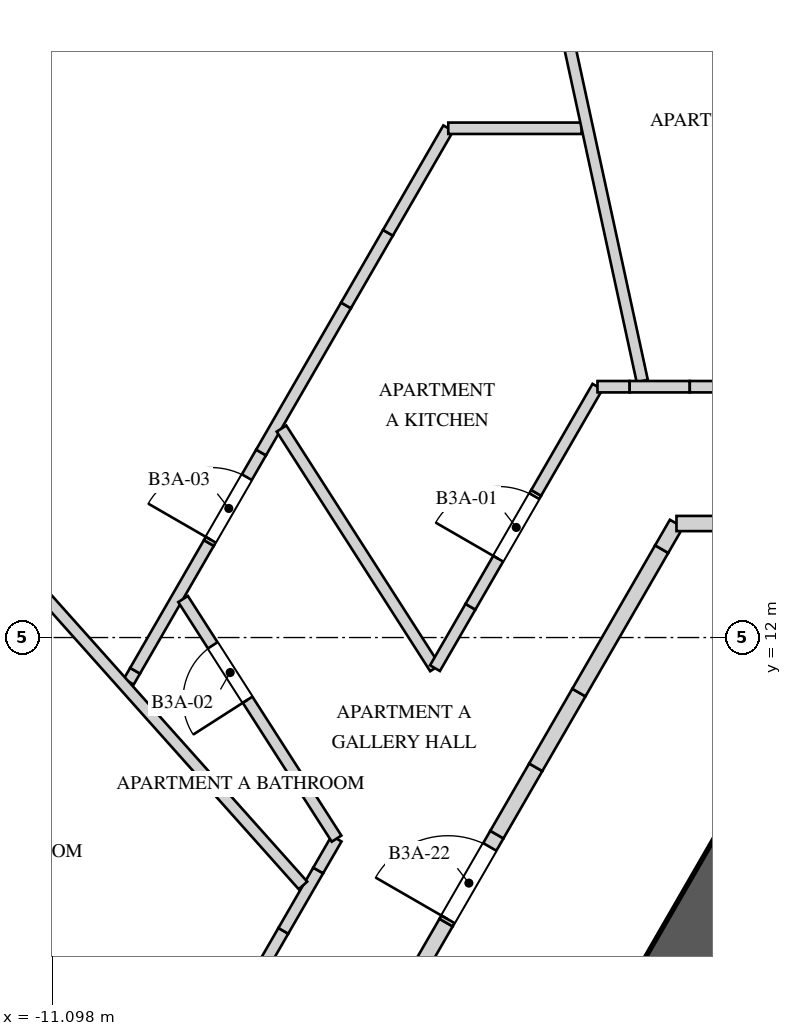
"""IFC4 building model, lengths in metres.
Left out: names, types, materials, properties, quantities, classifications, styles, units other than length and angle.
Written with IfcOpenShell. Run it as: python <this file> out.ifc"""

import sys

from ifc_helpers import new_model, si_unit, direction, frame, frame_2d, origin, place, context, subcontext, project, spatial, polyline, rectangle, outline, extrude, element, fill, save


model = new_model("IFC4")
c1 = context("Model", 3, precision=1e-05, world=origin(), true_north=direction((0.0, 1.0)))
c2 = subcontext(c1, "Body", "Model", "MODEL_VIEW")
j1 = project(units=[si_unit("LENGTHUNIT", "METRE"), si_unit("PLANEANGLEUNIT", "RADIAN")], contexts=[c1])
p1 = place(None, origin())
s1 = spatial("IfcSite", under=j1, at=p1, CompositionType="ELEMENT")
p2 = place(p1, origin())
s2 = spatial("IfcBuilding", under=s1, at=p2, CompositionType="ELEMENT")
p3 = place(p2, frame((0.0, 0.0, 129.6)))
s3 = spatial("IfcBuildingStorey", under=s2, at=p3, CompositionType="ELEMENT", Elevation=129.6)
p4 = place(p3, frame((-1.184, 10.55, 0.0), z_axis=(0.0, 0.0, 1.0), x_axis=(-0.500004814304, -0.866022624227, 0.0)))
e1 = element("IfcWall", 1, at=p4, inside=s3, PredefinedType="SHEAR", context=c2, shape_type="SweptSolid", body=[
    extrude(rectangle(XDim=17.09, YDim=0.9, at=frame_2d((8.545, 0.0))), origin(), (0.0, 0.0, 1.0), 4.0),
])
p5 = place(p4, frame((6.75, 0.0, 0.0)))
e2 = element("IfcOpeningElement", 2, at=p5, cuts=e1, PredefinedType="OPENING", context=c2, shape_type="SweptSolid", body=[
    extrude(rectangle(XDim=1.0, YDim=2.4, at=frame_2d((0.5, 1.2))), frame((0.0, 0.46, 0.0), z_axis=(0.0, -1.0, 0.0), x_axis=(1.0, 0.0, 0.0)), (0.0, 0.0, 1.0), 0.92),
])
p6 = place(p4, frame((14.678, 0.0, 0.0)))
e3 = element("IfcOpeningElement", 3, at=p6, cuts=e1, PredefinedType="OPENING", context=c2, shape_type="SweptSolid", body=[
    extrude(rectangle(XDim=0.8, YDim=2.1, at=frame_2d((0.4, 1.05))), frame((0.0, 0.46, 0.0), z_axis=(0.0, -1.0, 0.0), x_axis=(1.0, 0.0, 0.0)), (0.0, 0.0, 1.0), 0.92),
])
p7 = place(p3, frame((1.597, 19.024, 0.0), z_axis=(0.0, 0.0, 1.0), x_axis=(-0.838677021821, 0.54462909679, 0.0)))
e4 = element("IfcWall", 4, at=p7, inside=s3, PredefinedType="SOLIDWALL", context=c2, shape_type="SweptSolid", body=[
    extrude(rectangle(XDim=7.072, YDim=0.45, at=frame_2d((3.536, 0.0))), origin(), (0.0, 0.0, 1.0), 3.3),
])
p8 = place(p7, frame((0.195, 0.0, 0.5)))
e5 = element("IfcOpeningElement", 5, at=p8, cuts=e4, PredefinedType="OPENING", context=c2, shape_type="SweptSolid", body=[
    extrude(rectangle(XDim=1.75, YDim=2.65, at=frame_2d((0.875, 1.325))), frame((0.0, 0.235, 0.0), z_axis=(0.0, -1.0, 0.0), x_axis=(1.0, 0.0, 0.0)), (0.0, 0.0, 1.0), 0.47),
])
p9 = place(p7, frame((2.661, 0.0, 0.5)))
e6 = element("IfcOpeningElement", 6, at=p9, cuts=e4, PredefinedType="OPENING", context=c2, shape_type="SweptSolid", body=[
    extrude(rectangle(XDim=1.75, YDim=2.65, at=frame_2d((0.875, 1.325))), frame((0.0, 0.235, 0.0), z_axis=(0.0, -1.0, 0.0), x_axis=(1.0, 0.0, 0.0)), (0.0, 0.0, 1.0), 0.47),
])
p10 = place(p7, frame((5.126, 0.0, 0.5)))
e7 = element("IfcOpeningElement", 7, at=p10, cuts=e4, PredefinedType="OPENING", context=c2, shape_type="SweptSolid", body=[
    extrude(rectangle(XDim=1.75, YDim=2.0, at=frame_2d((0.875, 1.0))), frame((0.0, 0.235, 0.0), z_axis=(0.0, -1.0, 0.0), x_axis=(1.0, 0.0, 0.0)), (0.0, 0.0, 1.0), 0.47),
])
p11 = place(p3, frame((-0.766, 9.772, 0.0), z_axis=(0.0, 0.0, 1.0), x_axis=(-0.500009909098, -0.866019682689, 0.0)))
e8 = element("IfcWall", 8, at=p11, inside=s3, PredefinedType="SOLIDWALL", context=c2, shape_type="SweptSolid", body=[
    extrude(rectangle(XDim=6.2, YDim=0.4, at=frame_2d((3.1, 0.0))), origin(), (0.0, 0.0, 1.0), 3.65),
])
p12 = place(p3, frame((-9.458, 5.719, 0.0), z_axis=(0.0, 0.0, 1.0), x_axis=(0.499996941814, 0.866027169422, 0.0)))
e9 = element("IfcWall", 9, at=p12, inside=s3, PredefinedType="PARTITIONING", context=c2, shape_type="SweptSolid", body=[
    extrude(rectangle(XDim=2.797, YDim=0.15, at=frame_2d((1.399, 0.0))), origin(), (0.0, 0.0, 1.0), 3.65),
])
p13 = place(p12, frame((1.1, 0.0, 0.0)))
e10 = element("IfcOpeningElement", 10, at=p13, cuts=e9, PredefinedType="OPENING", context=c2, shape_type="SweptSolid", body=[
    extrude(rectangle(XDim=0.95, YDim=2.4, at=frame_2d((0.475, 1.2))), frame((0.0, 0.085, 0.0), z_axis=(0.0, -1.0, 0.0), x_axis=(1.0, 0.0, 0.0)), (0.0, 0.0, 1.0), 0.17),
])
p14 = place(p3, frame((-8.059, 8.141, 0.0), z_axis=(0.0, 0.0, 1.0), x_axis=(0.500060322201, 0.865990573944, 0.0)))
e11 = element("IfcWall", 11, at=p14, inside=s3, PredefinedType="PARTITIONING", context=c2, shape_type="SweptSolid", body=[
    extrude(rectangle(XDim=0.917, YDim=0.15, at=frame_2d((0.459, 0.0))), origin(), (0.0, 0.0, 1.0), 2.55),
])
p15 = place(p3, frame((-7.6, 8.936, 0.0), z_axis=(0.0, 0.0, 1.0), x_axis=(0.499941024108, 0.866059450854, 0.0)))
e12 = element("IfcWall", 12, at=p15, inside=s3, PredefinedType="PARTITIONING", context=c2, shape_type="SweptSolid", body=[
    extrude(rectangle(XDim=0.483, YDim=0.15, at=frame_2d((0.242, 0.0))), origin(), (0.0, 0.0, 1.0), 3.65),
])
p16 = place(p3, frame((-10.093, 11.419, 0.0), z_axis=(0.0, 0.0, 1.0), x_axis=(0.500399834964, 0.865794435861, 0.0)))
e13 = element("IfcWall", 13, at=p16, inside=s3, PredefinedType="PARTITIONING", context=c2, shape_type="SweptSolid", body=[
    extrude(rectangle(XDim=0.166, YDim=0.15, at=frame_2d((0.083, 0.0))), origin(), (0.0, 0.0, 1.0), 2.55),
])
p17 = place(p3, frame((-10.01, 11.563, 0.0), z_axis=(0.0, 0.0, 1.0), x_axis=(0.499994660107, 0.866028486751, 0.0)))
e14 = element("IfcWall", 14, at=p17, inside=s3, PredefinedType="PARTITIONING", context=c2, shape_type="SweptSolid", body=[
    extrude(rectangle(XDim=1.941, YDim=0.15, at=frame_2d((0.97, 0.0))), origin(), (0.0, 0.0, 1.0), 3.65),
])
p18 = place(p3, frame((-9.039, 13.244, 0.0), z_axis=(0.0, 0.0, 1.0), x_axis=(0.499978698016, 0.866037702141, 0.0)))
e15 = element("IfcWall", 15, at=p18, inside=s3, PredefinedType="PARTITIONING", context=c2, shape_type="SweptSolid", body=[
    extrude(outline(polyline([(0.0, 0.0), (1.375, 0.0), (1.375, 2.55), (0.38, 2.55), (0.38, 3.65), (0.0, 3.65), (0.0, 0.0)])), frame((0.0, 0.075, 0.0), z_axis=(0.0, -1.0, 0.0), x_axis=(1.0, 0.0, 0.0)), (0.0, 0.0, 1.0), 0.15),
])
p19 = place(p18, frame((0.05, 0.0, 0.0)))
e16 = element("IfcOpeningElement", 16, at=p19, cuts=e15, PredefinedType="OPENING", context=c2, shape_type="SweptSolid", body=[
    extrude(rectangle(XDim=0.95, YDim=2.4, at=frame_2d((0.475, 1.2))), frame((0.0, 0.085, 0.0), z_axis=(0.0, -1.0, 0.0), x_axis=(1.0, 0.0, 0.0)), (0.0, 0.0, 1.0), 0.17),
])
p20 = place(p3, frame((-8.352, 14.434, 0.0), z_axis=(0.0, 0.0, 1.0), x_axis=(0.500040905051, 0.866001785954, 0.0)))
e17 = element("IfcWall", 17, at=p20, inside=s3, PredefinedType="PARTITIONING", context=c2, shape_type="SweptSolid", body=[
    extrude(rectangle(XDim=2.234, YDim=0.15, at=frame_2d((1.117, 0.0))), origin(), (0.0, 0.0, 1.0), 3.65),
])
p21 = place(p3, frame((-7.235, 16.369, 0.0), z_axis=(0.0, 0.0, 1.0), x_axis=(0.499850094852, 0.866111934265, 0.0)))
e18 = element("IfcWall", 18, at=p21, inside=s3, PredefinedType="PARTITIONING", context=c2, shape_type="SweptSolid", body=[
    extrude(rectangle(XDim=1.104, YDim=0.15, at=frame_2d((0.552, 0.0))), origin(), (0.0, 0.0, 1.0), 2.55),
])
p22 = place(p3, frame((-6.683, 17.325, 0.0), z_axis=(0.0, 0.0, 1.0), x_axis=(0.500108487576, 0.865962759392, 0.0)))
e19 = element("IfcWall", 19, at=p22, inside=s3, PredefinedType="PARTITIONING", context=c2, shape_type="SweptSolid", body=[
    extrude(rectangle(XDim=1.588, YDim=0.15, at=frame_2d((0.794, 0.0))), origin(), (0.0, 0.0, 1.0), 3.65),
])
p23 = place(p3, frame((-9.658, 5.522, 0.0), z_axis=(0.0, 0.0, 1.0), x_axis=(-0.868078092768, 0.496427663267, 0.0)))
e20 = element("IfcWall", 20, at=p23, inside=s3, PredefinedType="PARTITIONING", context=c2, shape_type="SweptSolid", body=[
    extrude(rectangle(XDim=7.467, YDim=0.15, at=frame_2d((3.733, 0.0))), origin(), (0.0, 0.0, 1.0), 2.75),
])
p24 = place(p3, frame((-8.083, 14.749, 0.0), z_axis=(0.0, 0.0, 1.0), x_axis=(0.539468172068, -0.842005992452, 0.0)))
e21 = element("IfcWall", 21, at=p24, inside=s3, PredefinedType="PARTITIONING", context=c2, shape_type="SweptSolid", body=[
    extrude(rectangle(XDim=3.744, YDim=0.15, at=frame_2d((1.872, 0.0))), origin(), (0.0, 0.0, 1.0), 3.65),
])
p25 = place(p3, frame((-7.801, 8.739, 0.0), z_axis=(0.0, 0.0, 1.0), x_axis=(-0.665934790779, 0.746009955986, 0.0)))
e22 = element("IfcWall", 22, at=p25, inside=s3, PredefinedType="PARTITIONING", context=c2, shape_type="SweptSolid", body=[
    extrude(rectangle(XDim=11.863, YDim=0.15, at=frame_2d((5.932, 0.0))), origin(), (0.0, 0.0, 1.0), 2.55),
])
p26 = place(p3, frame((-7.359, 9.354, 0.0), z_axis=(0.0, 0.0, 1.0), x_axis=(-0.539468172068, 0.842005992452, 0.0)))
e23 = element("IfcWall", 23, at=p26, inside=s3, PredefinedType="PARTITIONING", context=c2, shape_type="SweptSolid", body=[
    extrude(rectangle(XDim=3.744, YDim=0.15, at=frame_2d((1.872, 0.0))), origin(), (0.0, 0.0, 1.0), 3.65),
])
p27 = place(p26, frame((2.17, 0.0, 0.0)))
e24 = element("IfcOpeningElement", 24, at=p27, cuts=e23, PredefinedType="OPENING", context=c2, shape_type="SweptSolid", body=[
    extrude(rectangle(XDim=0.85, YDim=2.4, at=frame_2d((0.425, 1.2))), frame((0.0, 0.085, 0.0), z_axis=(0.0, -1.0, 0.0), x_axis=(1.0, 0.0, 0.0)), (0.0, 0.0, 1.0), 0.17),
])
p28 = place(p3, frame((-6.064, 11.597, 0.0), z_axis=(0.0, 0.0, 1.0), x_axis=(0.499797962495, 0.866142018774, 0.0)))
e25 = element("IfcWall", 25, at=p28, inside=s3, PredefinedType="PARTITIONING", context=c2, shape_type="SweptSolid", body=[
    extrude(rectangle(XDim=0.933, YDim=0.15, at=frame_2d((0.467, 0.0))), origin(), (0.0, 0.0, 1.0), 3.65),
])
p29 = place(p3, frame((-5.597, 12.405, 0.0), z_axis=(0.0, 0.0, 1.0), x_axis=(0.500040090343, 0.866002256377, 0.0)))
e26 = element("IfcWall", 26, at=p29, inside=s3, PredefinedType="PARTITIONING", context=c2, shape_type="SweptSolid", body=[
    extrude(outline(polyline([(0.0, 0.0), (1.73, 0.0), (1.73, 3.65), (1.104, 3.65), (1.104, 2.55), (0.0, 2.55), (0.0, 0.0)])), frame((0.0, 0.075, 0.0), z_axis=(0.0, -1.0, 0.0), x_axis=(1.0, 0.0, 0.0)), (0.0, 0.0, 1.0), 0.15),
])
p30 = place(p29, frame((0.73, 0.0, 0.0)))
e27 = element("IfcOpeningElement", 27, at=p30, cuts=e26, PredefinedType="OPENING", context=c2, shape_type="SweptSolid", body=[
    extrude(rectangle(XDim=0.95, YDim=2.4, at=frame_2d((0.475, 1.2))), frame((0.0, 0.085, 0.0), z_axis=(0.0, -1.0, 0.0), x_axis=(1.0, 0.0, 0.0)), (0.0, 0.0, 1.0), 0.17),
])
p31 = place(p3, frame((-4.732, 13.903, 0.0), z_axis=(0.0, 0.0, 1.0), x_axis=(0.499997628298, 0.866026773083, 0.0)))
e28 = element("IfcWall", 28, at=p31, inside=s3, PredefinedType="PARTITIONING", context=c2, shape_type="SweptSolid", body=[
    extrude(rectangle(XDim=1.613, YDim=0.15, at=frame_2d((0.806, 0.0))), origin(), (0.0, 0.0, 1.0), 3.65),
])
p32 = place(p3, frame((-5.889, 18.7, 0.0), z_axis=(0.0, 0.0, 1.0), x_axis=(1.0, 0.0, 0.0)))
e29 = element("IfcWall", 29, at=p32, inside=s3, PredefinedType="PARTITIONING", context=c2, shape_type="SweptSolid", body=[
    extrude(rectangle(XDim=1.753, YDim=0.15, at=frame_2d((0.877, 0.0))), origin(), (0.0, 0.0, 1.0), 3.65),
])
p33 = place(p3, frame((-5.001, 23.041, 0.0), z_axis=(0.0, 0.0, 1.0), x_axis=(0.212100148987, -0.977247935173, 0.0)))
e30 = element("IfcWall", 30, at=p33, inside=s3, PredefinedType="PARTITIONING", context=c2, shape_type="SweptSolid", body=[
    extrude(rectangle(XDim=7.844, YDim=0.15, at=frame_2d((3.922, 0.0))), origin(), (0.0, 0.0, 1.0), 2.75),
])
p34 = place(p3, frame((-3.926, 15.3, 0.0), z_axis=(0.0, 0.0, 1.0), x_axis=(1.0, 0.0, 0.0)))
e31 = element("IfcWall", 31, at=p34, inside=s3, PredefinedType="PARTITIONING", context=c2, shape_type="SweptSolid", body=[
    extrude(rectangle(XDim=0.423, YDim=0.15, at=frame_2d((0.212, 0.0))), origin(), (0.0, 0.0, 1.0), 3.65),
])
p35 = place(p3, frame((-3.503, 15.3, 0.0), z_axis=(0.0, 0.0, 1.0), x_axis=(1.0, 0.0, 0.0)))
e32 = element("IfcWall", 32, at=p35, inside=s3, PredefinedType="PARTITIONING", context=c2, shape_type="SweptSolid", body=[
    extrude(rectangle(XDim=0.791, YDim=0.15, at=frame_2d((0.396, 0.0))), origin(), (0.0, 0.0, 1.0), 2.75),
])
p36 = place(p3, frame((-2.712, 15.3, 0.0), z_axis=(0.0, 0.0, 1.0), x_axis=(1.0, 0.0, 0.0)))
e33 = element("IfcWall", 33, at=p36, inside=s3, PredefinedType="PARTITIONING", context=c2, shape_type="SweptSolid", body=[
    extrude(rectangle(XDim=4.209, YDim=0.15, at=frame_2d((2.105, 0.0))), origin(), (0.0, 0.0, 1.0), 3.65),
])
p37 = place(p36, frame((2.518, 0.0, 0.0)))
e34 = element("IfcOpeningElement", 34, at=p37, cuts=e33, PredefinedType="OPENING", context=c2, shape_type="SweptSolid", body=[
    extrude(rectangle(XDim=0.95, YDim=2.4, at=frame_2d((0.475, 1.2))), frame((0.0, 0.085, 0.0), z_axis=(0.0, -1.0, 0.0), x_axis=(1.0, 0.0, 0.0)), (0.0, 0.0, 1.0), 0.17),
])
p38 = place(p3, frame((-6.318, 7.556, 0.0), z_axis=(0.0, 0.0, 1.0), x_axis=(0.499942357345, 0.866058681229, 0.0)))
e35 = element("IfcWall", 35, at=p38, inside=s3, PredefinedType="SOLIDWALL", context=c2, shape_type="SweptSolid", body=[
    extrude(rectangle(XDim=0.801, YDim=0.2, at=frame_2d((0.4, 0.0))), origin(), (0.0, 0.0, 1.0), 3.65),
])
p39 = place(p3, frame((-5.918, 8.25, 0.0), z_axis=(0.0, 0.0, 1.0), x_axis=(0.500028081597, 0.86600919026, 0.0)))
e36 = element("IfcWall", 36, at=p39, inside=s3, PredefinedType="SOLIDWALL", context=c2, shape_type="SweptSolid", body=[
    extrude(outline(polyline([(0.0, 0.0), (1.337, 0.0), (1.337, 2.55), (0.313, 2.55), (0.313, 3.65), (0.0, 3.65), (0.0, 0.0)])), frame((0.0, 0.1, 0.0), z_axis=(0.0, -1.0, 0.0), x_axis=(1.0, 0.0, 0.0)), (0.0, 0.0, 1.0), 0.2),
])
p40 = place(p39, frame((0.05, 0.0, 0.0)))
e37 = element("IfcOpeningElement", 37, at=p40, cuts=e36, PredefinedType="OPENING", context=c2, shape_type="SweptSolid", body=[
    extrude(rectangle(XDim=1.1, YDim=2.4, at=frame_2d((0.55, 1.2))), frame((0.0, 0.11, 0.0), z_axis=(0.0, -1.0, 0.0), x_axis=(1.0, 0.0, 0.0)), (0.0, 0.0, 1.0), 0.22),
])
p41 = place(p3, frame((-5.25, 9.407, 0.0), z_axis=(0.0, 0.0, 1.0), x_axis=(0.499991148707, 0.866030514021, 0.0)))
e38 = element("IfcWall", 38, at=p41, inside=s3, PredefinedType="SOLIDWALL", context=c2, shape_type="SweptSolid", body=[
    extrude(rectangle(XDim=1.022, YDim=0.2, at=frame_2d((0.511, 0.0))), origin(), (0.0, 0.0, 1.0), 3.65),
])
p42 = place(p3, frame((-4.738, 10.293, 0.0), z_axis=(0.0, 0.0, 1.0), x_axis=(0.500001688065, 0.866024429177, 0.0)))
e39 = element("IfcWall", 39, at=p42, inside=s3, PredefinedType="SOLIDWALL", context=c2, shape_type="SweptSolid", body=[
    extrude(rectangle(XDim=1.135, YDim=0.2, at=frame_2d((0.568, 0.0))), origin(), (0.0, 0.0, 1.0), 2.55),
])
p43 = place(p3, frame((-4.171, 11.276, 0.0), z_axis=(0.0, 0.0, 1.0), x_axis=(0.50001992892, 0.866013897511, 0.0)))
e40 = element("IfcWall", 40, at=p43, inside=s3, PredefinedType="SOLIDWALL", context=c2, shape_type="SweptSolid", body=[
    extrude(rectangle(XDim=2.179, YDim=0.2, at=frame_2d((1.089, 0.0))), origin(), (0.0, 0.0, 1.0), 3.65),
])
p44 = place(p3, frame((-3.081, 13.163, 0.0), z_axis=(0.0, 0.0, 1.0), x_axis=(0.499849133735, 0.866112488944, 0.0)))
e41 = element("IfcWall", 41, at=p44, inside=s3, PredefinedType="SOLIDWALL", context=c2, shape_type="SweptSolid", body=[
    extrude(rectangle(XDim=0.389, YDim=0.2, at=frame_2d((0.195, 0.0))), origin(), (0.0, 0.0, 1.0), 2.75),
])
p45 = place(p3, frame((-2.887, 13.5, 0.0), z_axis=(0.0, 0.0, 1.0), x_axis=(1.0, 0.0, 0.0)))
e42 = element("IfcWall", 42, at=p45, inside=s3, PredefinedType="SOLIDWALL", context=c2, shape_type="SweptSolid", body=[
    extrude(rectangle(XDim=0.553, YDim=0.2, at=frame_2d((0.277, 0.0))), origin(), (0.0, 0.0, 1.0), 2.75),
])
p46 = place(p30, origin())
e43 = element("IfcDoor", 43, at=p46, inside=s3, OperationType="SINGLE_SWING_LEFT", PredefinedType="DOOR", context=c2, shape_type="SweptSolid", body=[
    extrude(rectangle(XDim=0.95, YDim=2.4, at=frame_2d((0.475, 1.2))), frame((0.0, 0.025, 0.0), z_axis=(0.0, -1.0, 0.0), x_axis=(1.0, 0.0, 0.0)), (0.0, 0.0, 1.0), 0.05),
])
fill(e27, e43)
p47 = place(p27, origin())
e44 = element("IfcDoor", 44, at=p47, inside=s3, OperationType="SINGLE_SWING_RIGHT", PredefinedType="DOOR", context=c2, shape_type="SweptSolid", body=[
    extrude(rectangle(XDim=0.85, YDim=2.4, at=frame_2d((0.425, 1.2))), frame((0.0, 0.025, 0.0), z_axis=(0.0, -1.0, 0.0), x_axis=(1.0, 0.0, 0.0)), (0.0, 0.0, 1.0), 0.05),
])
fill(e24, e44)
p48 = place(p19, origin())
e45 = element("IfcDoor", 45, at=p48, inside=s3, OperationType="SINGLE_SWING_LEFT", PredefinedType="DOOR", context=c2, shape_type="SweptSolid", body=[
    extrude(rectangle(XDim=0.95, YDim=2.4, at=frame_2d((0.475, 1.2))), frame((0.0, 0.025, 0.0), z_axis=(0.0, -1.0, 0.0), x_axis=(1.0, 0.0, 0.0)), (0.0, 0.0, 1.0), 0.05),
])
fill(e16, e45)
p49 = place(p40, origin())
e46 = element("IfcDoor", 46, at=p49, inside=s3, OperationType="SINGLE_SWING_RIGHT", PredefinedType="DOOR", context=c2, shape_type="SweptSolid", body=[
    extrude(rectangle(XDim=1.1, YDim=2.4, at=frame_2d((0.55, 1.2))), frame((0.0, 0.025, 0.0), z_axis=(0.0, -1.0, 0.0), x_axis=(1.0, 0.0, 0.0)), (0.0, 0.0, 1.0), 0.05),
])
fill(e37, e46)
save(model, sys.argv[1])
